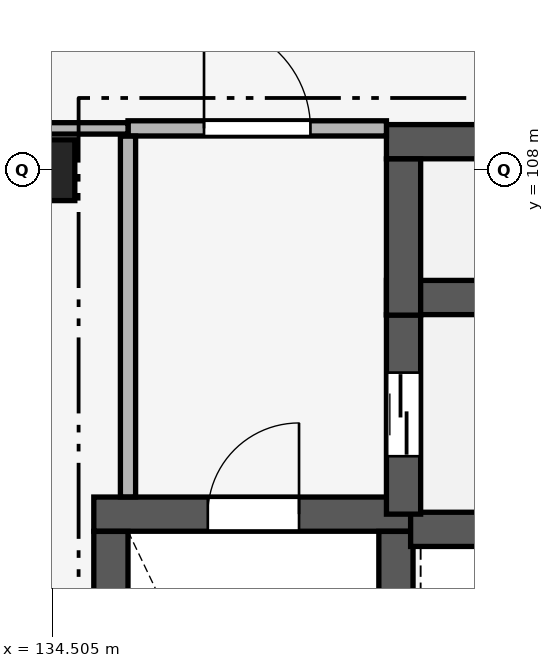
"""IFC4 building model, lengths in metres.
Left out: names, types, materials, properties, quantities, classifications, styles, units other than length and angle.
Written with IfcOpenShell. Run it as: python <this file> out.ifc"""

import sys

from ifc_helpers import new_model, si_unit, direction, frame, frame_2d, origin, origin_2d, place, context, subcontext, project, spatial, rectangle, extrude, element, fill, save


model = new_model("IFC4")
c1 = context("Model", 3, precision=1e-05, world=origin(), true_north=direction((0.0, 1.0)))
c2 = subcontext(c1, "Body", "Model", "MODEL_VIEW")
j1 = project(units=[si_unit("LENGTHUNIT", "METRE"), si_unit("PLANEANGLEUNIT", "RADIAN")], contexts=[c1])
p1 = place(None, origin())
s1 = spatial("IfcSite", under=j1, at=p1, CompositionType="ELEMENT")
p2 = place(p1, origin())
s2 = spatial("IfcBuilding", under=s1, at=p2, CompositionType="ELEMENT")
p3 = place(p2, frame((0.0, 0.0, 10.2)))
s3 = spatial("IfcBuildingStorey", under=s2, at=p3, CompositionType="ELEMENT", Elevation=10.2)
p4 = place(p3, frame((134.4, 108.0, 0.0), z_axis=(0.0, 0.0, 1.0), x_axis=(1.0, 0.0, 0.0)))
e1 = element("IfcColumn", 1, at=p4, inside=s3, PredefinedType="COLUMN", context=c2, shape_type="SweptSolid", body=[
    extrude(rectangle(XDim=0.8, YDim=0.8, at=origin_2d()), origin(), (0.0, 0.0, 1.0), 5.1),
])
p5 = place(p3, frame((135.05, 103.475, 0.0), z_axis=(0.0, 0.0, 1.0), x_axis=(1.0, 0.0, 0.0)))
e2 = element("IfcWall", 2, at=p5, inside=s3, PredefinedType="SHEAR", context=c2, shape_type="SweptSolid", body=[
    extrude(rectangle(XDim=4.2, YDim=0.45, at=frame_2d((2.1, 0.0))), origin(), (0.0, 0.0, 1.0), 4.82),
])
p6 = place(p5, frame((1.5, 0.0, 0.0)))
e3 = element("IfcOpeningElement", 3, at=p6, cuts=e2, PredefinedType="OPENING", context=c2, shape_type="SweptSolid", body=[
    extrude(rectangle(XDim=1.2, YDim=2.2, at=frame_2d((0.6, 1.1))), frame((0.0, 0.24, 0.0), z_axis=(0.0, -1.0, 0.0), x_axis=(1.0, 0.0, 0.0)), (0.0, 0.0, 1.0), 0.48),
])
for number, where, z_axis, x_axis in (
    (4, (135.275, 96.352, 0.0), (0.0, 0.0, 1.0), (0.0, 1.0, 0.0)),
    (5, (139.025, 96.352, 0.0), (0.0, 0.0, 1.0), (0.0, 1.0, 0.0)),
):
    element("IfcWall", number, at=place(p3, frame(where, z_axis=z_axis, x_axis=x_axis)), inside=s3, PredefinedType="SHEAR", context=c2, shape_type="SweptSolid", body=[
        extrude(rectangle(XDim=6.896, YDim=0.45, at=frame_2d((3.448, 0.0))), origin(), (0.0, 0.0, 1.0), 4.82),
    ])
p7 = place(p3, frame((139.218, 103.275, 0.0), z_axis=(0.0, 0.0, 1.0), x_axis=(1.0, 0.0, 0.0)))
e6 = element("IfcWall", 6, at=p7, inside=s3, PredefinedType="SHEAR", context=c2, shape_type="SweptSolid", body=[
    extrude(rectangle(XDim=2.982, YDim=0.45, at=frame_2d((1.491, 0.0))), origin(), (0.0, 0.0, 1.0), 4.82),
])
p8 = place(p3, frame((138.9, 106.325, 0.0), z_axis=(0.0, 0.0, 1.0), x_axis=(1.0, 0.0, 0.0)))
e7 = element("IfcWall", 7, at=p8, inside=s3, PredefinedType="SHEAR", context=c2, shape_type="SweptSolid", body=[
    extrude(rectangle(XDim=3.3, YDim=0.45, at=frame_2d((1.65, 0.0))), origin(), (0.0, 0.0, 1.0), 4.82),
])
p9 = place(p3, frame((139.125, 103.475, 0.0), z_axis=(0.0, 0.0, 1.0), x_axis=(0.0, 1.0, 0.0)))
e8 = element("IfcWall", 8, at=p9, inside=s3, PredefinedType="SHEAR", context=c2, shape_type="SweptSolid", body=[
    extrude(rectangle(XDim=2.623, YDim=0.45, at=frame_2d((1.312, 0.0))), origin(), (0.0, 0.0, 1.0), 4.82),
])
p10 = place(p9, frame((0.762, 0.0, 0.0)))
e9 = element("IfcOpeningElement", 9, at=p10, cuts=e8, PredefinedType="OPENING", context=c2, shape_type="SweptSolid", body=[
    extrude(rectangle(XDim=1.1, YDim=2.15, at=frame_2d((0.55, 1.075))), frame((0.0, 0.24, 0.0), z_axis=(0.0, -1.0, 0.0), x_axis=(1.0, 0.0, 0.0)), (0.0, 0.0, 1.0), 0.48),
])
p11 = place(p3, frame((138.9, 108.375, 0.0), z_axis=(0.0, 0.0, 1.0), x_axis=(1.0, 0.0, 0.0)))
e10 = element("IfcWall", 10, at=p11, inside=s3, PredefinedType="SHEAR", context=c2, shape_type="SweptSolid", body=[
    extrude(rectangle(XDim=3.505, YDim=0.45, at=frame_2d((1.752, 0.0))), origin(), (0.0, 0.0, 1.0), 4.82),
])
p12 = place(p11, frame((1.202, 0.0, 0.0)))
e11 = element("IfcOpeningElement", 11, at=p12, cuts=e10, PredefinedType="OPENING", context=c2, shape_type="SweptSolid", body=[
    extrude(rectangle(XDim=1.1, YDim=2.15, at=frame_2d((0.55, 1.075))), frame((0.0, 0.24, 0.0), z_axis=(0.0, -1.0, 0.0), x_axis=(1.0, 0.0, 0.0)), (0.0, 0.0, 1.0), 0.48),
])
p13 = place(p3, frame((139.125, 106.093, 0.0), z_axis=(0.0, 0.0, 1.0), x_axis=(0.0, 1.0, 0.0)))
e12 = element("IfcWall", 12, at=p13, inside=s3, PredefinedType="SHEAR", context=c2, shape_type="SweptSolid", body=[
    extrude(rectangle(XDim=2.055, YDim=0.45, at=frame_2d((1.027, 0.0))), origin(), (0.0, 0.0, 1.0), 4.82),
])
p14 = place(p3, frame((135.5, 108.55, 0.0), z_axis=(0.0, 0.0, 1.0), x_axis=(1.0, 0.0, 0.0)))
e13 = element("IfcWall", 13, at=p14, inside=s3, PredefinedType="PARTITIONING", context=c2, shape_type="SweptSolid", body=[
    extrude(rectangle(XDim=3.4, YDim=0.2, at=frame_2d((1.7, 0.0))), origin(), (0.0, 0.0, 1.0), 4.82),
])
p15 = place(p14, frame((1.0, 0.0, 0.0)))
e14 = element("IfcOpeningElement", 14, at=p15, cuts=e13, PredefinedType="OPENING", context=c2, shape_type="SweptSolid", body=[
    extrude(rectangle(XDim=1.4, YDim=2.2, at=frame_2d((0.7, 1.1))), frame((0.0, 0.115, 0.0), z_axis=(0.0, -1.0, 0.0), x_axis=(1.0, 0.0, 0.0)), (0.0, 0.0, 1.0), 0.23),
])
p16 = place(p3, frame((134.2, 108.55, 0.0), z_axis=(0.0, 0.0, 1.0), x_axis=(1.0, 0.0, 0.0)))
e15 = element("IfcWall", 15, at=p16, inside=s3, PredefinedType="PARTITIONING", context=c2, shape_type="SweptSolid", body=[
    extrude(rectangle(XDim=1.3, YDim=0.15, at=frame_2d((0.65, 0.0))), origin(), (0.0, 0.0, 1.0), 4.27),
])
p17 = place(p3, frame((135.5, 103.702, 0.0), z_axis=(0.0, 0.0, 1.0), x_axis=(0.0, 1.0, 0.0)))
e16 = element("IfcWall", 16, at=p17, inside=s3, PredefinedType="PARTITIONING", context=c2, shape_type="SweptSolid", body=[
    extrude(rectangle(XDim=4.746, YDim=0.2, at=frame_2d((2.373, 0.0))), origin(), (0.0, 0.0, 1.0), 4.82),
])
p18 = place(p6, origin())
e17 = element("IfcDoor", 17, at=p18, inside=s3, OperationType="SINGLE_SWING_RIGHT", PredefinedType="DOOR", context=c2, shape_type="SweptSolid", body=[
    extrude(rectangle(XDim=1.2, YDim=2.2, at=frame_2d((0.6, 1.1))), frame((0.0, 0.025, 0.0), z_axis=(0.0, -1.0, 0.0), x_axis=(1.0, 0.0, 0.0)), (0.0, 0.0, 1.0), 0.05),
])
fill(e3, e17)
p19 = place(p10, origin())
e18 = element("IfcDoor", 18, at=p19, inside=s3, OperationType="DOUBLE_DOOR_SLIDING", PredefinedType="DOOR", context=c2, shape_type="SweptSolid", body=[
    extrude(rectangle(XDim=1.1, YDim=2.15, at=frame_2d((0.55, 1.075))), frame((0.0, 0.025, 0.0), z_axis=(0.0, -1.0, 0.0), x_axis=(1.0, 0.0, 0.0)), (0.0, 0.0, 1.0), 0.05),
])
fill(e9, e18)
p20 = place(p15, origin())
e19 = element("IfcDoor", 19, at=p20, inside=s3, OperationType="SINGLE_SWING_LEFT", PredefinedType="DOOR", context=c2, shape_type="SweptSolid", body=[
    extrude(rectangle(XDim=1.4, YDim=2.2, at=frame_2d((0.7, 1.1))), frame((0.0, 0.025, 0.0), z_axis=(0.0, -1.0, 0.0), x_axis=(1.0, 0.0, 0.0)), (0.0, 0.0, 1.0), 0.05),
])
fill(e14, e19)
save(model, sys.argv[1])
